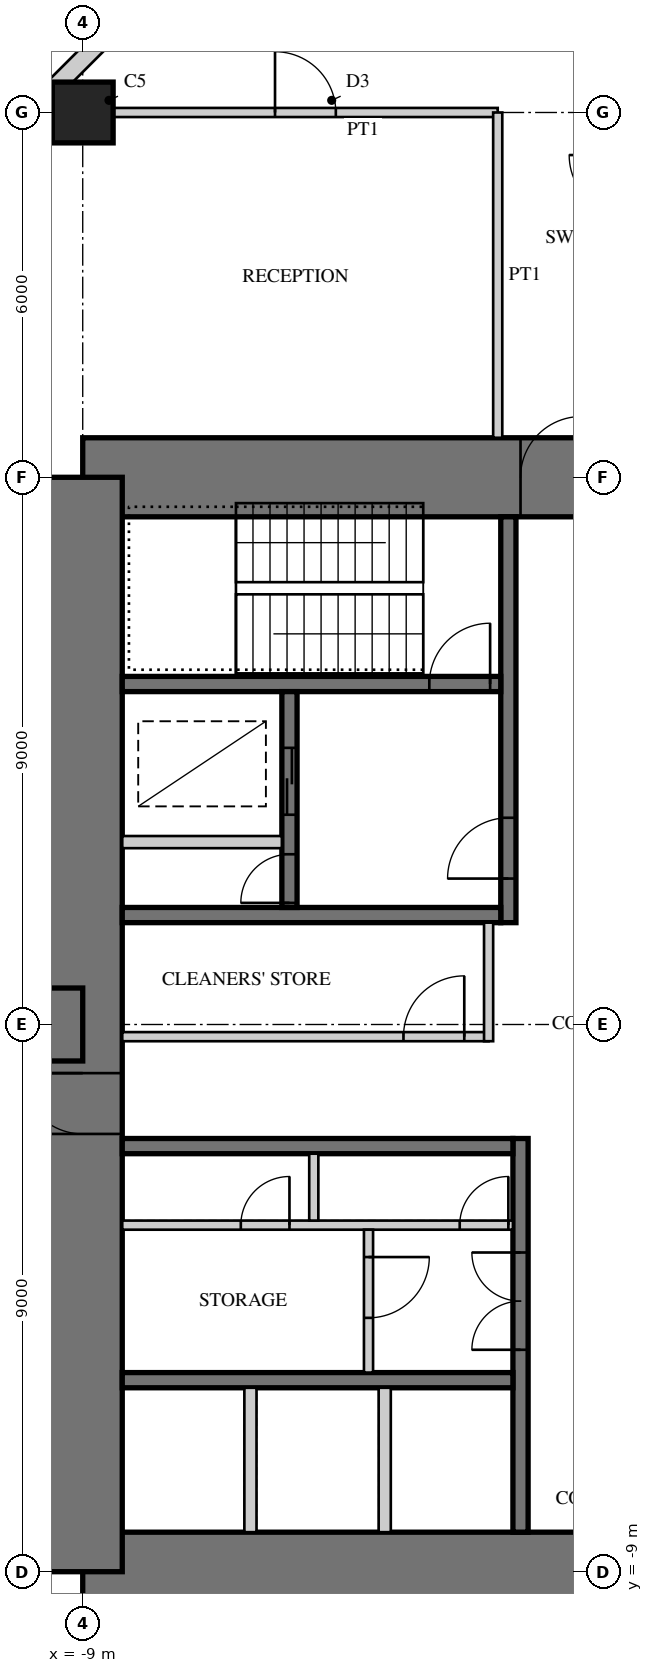
"""IFC4 building model, lengths in metres.
Left out: names, types, materials, properties, quantities, classifications, styles, units other than length and angle.
Written with IfcOpenShell. Run it as: python <this file> out.ifc"""

import sys

from ifc_helpers import new_model, si_unit, direction, frame, frame_2d, origin, origin_2d, place, context, subcontext, project, spatial, rectangle, extrude, element, fill, save


model = new_model("IFC4")
c1 = context("Model", 3, precision=1e-05, world=origin(), true_north=direction((0.0, 1.0)))
c2 = subcontext(c1, "Body", "Model", "MODEL_VIEW")
j1 = project(units=[si_unit("LENGTHUNIT", "METRE"), si_unit("PLANEANGLEUNIT", "RADIAN")], contexts=[c1])
p1 = place(None, origin())
s1 = spatial("IfcSite", under=j1, at=p1, CompositionType="ELEMENT")
p2 = place(p1, origin())
s2 = spatial("IfcBuilding", under=s1, at=p2, CompositionType="ELEMENT")
p3 = place(p2, frame((0.0, 0.0, 152.5)))
s3 = spatial("IfcBuildingStorey", under=s2, at=p3, CompositionType="ELEMENT", Elevation=152.5)
p4 = place(p3, frame((9.0, 9.0, 0.0), z_axis=(0.0, 0.0, 1.0), x_axis=(-1.0, 0.0, 0.0)))
e1 = element("IfcWall", 1, at=p4, inside=s3, PredefinedType="SHEAR", context=c2, shape_type="SweptSolid", body=[
    extrude(rectangle(XDim=18.0, YDim=1.3, at=frame_2d((9.0, 0.0))), origin(), (0.0, 0.0, 1.0), 4.0),
])
p5 = place(p4, frame((9.8, 0.0, 0.0)))
e2 = element("IfcOpeningElement", 2, at=p5, cuts=e1, PredefinedType="OPENING", context=c2, shape_type="SweptSolid", body=[
    extrude(rectangle(XDim=1.0, YDim=2.4, at=frame_2d((0.5, 1.2))), frame((0.0, 0.66, 0.0), z_axis=(0.0, -1.0, 0.0), x_axis=(1.0, 0.0, 0.0)), (0.0, 0.0, 1.0), 1.32),
])
p6 = place(p3, frame((-9.0, -9.0, 0.0), z_axis=(0.0, 0.0, 1.0), x_axis=(1.0, 0.0, 0.0)))
e3 = element("IfcWall", 3, at=p6, inside=s3, PredefinedType="SHEAR", context=c2, shape_type="SweptSolid", body=[
    extrude(rectangle(XDim=18.0, YDim=1.3, at=frame_2d((9.0, 0.0))), origin(), (0.0, 0.0, 1.0), 4.0),
])
p7 = place(p6, frame((9.8, 0.0, 0.0)))
e4 = element("IfcOpeningElement", 4, at=p7, cuts=e3, PredefinedType="OPENING", context=c2, shape_type="SweptSolid", body=[
    extrude(rectangle(XDim=1.0, YDim=2.4, at=frame_2d((0.5, 1.2))), frame((0.0, 0.66, 0.0), z_axis=(0.0, -1.0, 0.0), x_axis=(1.0, 0.0, 0.0)), (0.0, 0.0, 1.0), 1.32),
])
p8 = place(p3, frame((-9.0, 9.0, 0.0), z_axis=(0.0, 0.0, 1.0), x_axis=(0.0, -1.0, 0.0)))
e5 = element("IfcWall", 5, at=p8, inside=s3, PredefinedType="SHEAR", context=c2, shape_type="SweptSolid", body=[
    extrude(rectangle(XDim=18.0, YDim=1.3, at=frame_2d((9.0, 0.0))), origin(), (0.0, 0.0, 1.0), 4.0),
])
p9 = place(p8, frame((9.8, 0.0, 0.0)))
e6 = element("IfcOpeningElement", 6, at=p9, cuts=e5, PredefinedType="OPENING", context=c2, shape_type="SweptSolid", body=[
    extrude(rectangle(XDim=1.0, YDim=2.4, at=frame_2d((0.5, 1.2))), frame((0.0, 0.66, 0.0), z_axis=(0.0, -1.0, 0.0), x_axis=(1.0, 0.0, 0.0)), (0.0, 0.0, 1.0), 1.32),
])
p10 = place(p3, frame((-2.0, 1.675, 0.0), z_axis=(0.0, 0.0, 1.0), x_axis=(0.0, 1.0, 0.0)))
e7 = element("IfcWall", 7, at=p10, inside=s3, PredefinedType="SHEAR", context=c2, shape_type="SweptSolid", body=[
    extrude(rectangle(XDim=6.675, YDim=0.25, at=frame_2d((3.337, 0.0))), origin(), (0.0, 0.0, 1.0), 4.0),
])
p11 = place(p10, frame((0.725, 0.0, 0.0)))
e8 = element("IfcOpeningElement", 8, at=p11, cuts=e7, PredefinedType="OPENING", context=c2, shape_type="SweptSolid", body=[
    extrude(rectangle(XDim=1.0, YDim=2.1, at=frame_2d((0.5, 1.05))), frame((0.0, 0.135, 0.0), z_axis=(0.0, -1.0, 0.0), x_axis=(1.0, 0.0, 0.0)), (0.0, 0.0, 1.0), 0.27),
])
p12 = place(p3, frame((-2.125, 1.8, 0.0), z_axis=(0.0, 0.0, 1.0), x_axis=(-1.0, 0.0, 0.0)))
e9 = element("IfcWall", 9, at=p12, inside=s3, PredefinedType="SHEAR", context=c2, shape_type="SweptSolid", body=[
    extrude(rectangle(XDim=6.225, YDim=0.25, at=frame_2d((3.113, 0.0))), origin(), (0.0, 0.0, 1.0), 4.0),
])
p13 = place(p3, frame((-2.125, 5.6, 0.0), z_axis=(0.0, 0.0, 1.0), x_axis=(-1.0, 0.0, 0.0)))
e10 = element("IfcWall", 10, at=p13, inside=s3, PredefinedType="SHEAR", context=c2, shape_type="SweptSolid", body=[
    extrude(rectangle(XDim=6.225, YDim=0.25, at=frame_2d((3.113, 0.0))), origin(), (0.0, 0.0, 1.0), 4.0),
])
p14 = place(p13, frame((0.175, 0.0, 0.0)))
e11 = element("IfcOpeningElement", 11, at=p14, cuts=e10, PredefinedType="OPENING", context=c2, shape_type="SweptSolid", body=[
    extrude(rectangle(XDim=1.0, YDim=2.1, at=frame_2d((0.5, 1.05))), frame((0.0, 0.135, 0.0), z_axis=(0.0, -1.0, 0.0), x_axis=(1.0, 0.0, 0.0)), (0.0, 0.0, 1.0), 0.27),
])
p15 = place(p3, frame((-5.6, 1.925, 0.0), z_axis=(0.0, 0.0, 1.0), x_axis=(0.0, 1.0, 0.0)))
e12 = element("IfcWall", 12, at=p15, inside=s3, PredefinedType="SHEAR", context=c2, shape_type="SweptSolid", body=[
    extrude(rectangle(XDim=3.55, YDim=0.25, at=frame_2d((1.775, 0.0))), origin(), (0.0, 0.0, 1.0), 4.0),
])
p16 = place(p15, frame((1.525, 0.0, 0.0)))
e13 = element("IfcOpeningElement", 13, at=p16, cuts=e12, PredefinedType="OPENING", context=c2, shape_type="SweptSolid", body=[
    extrude(rectangle(XDim=1.1, YDim=2.2, at=frame_2d((0.55, 1.1))), frame((0.0, 0.135, 0.0), z_axis=(0.0, -1.0, 0.0), x_axis=(1.0, 0.0, 0.0)), (0.0, 0.0, 1.0), 0.27),
])
p17 = place(p15, frame((0.075, 0.0, 0.0)))
e14 = element("IfcOpeningElement", 14, at=p17, cuts=e12, PredefinedType="OPENING", context=c2, shape_type="SweptSolid", body=[
    extrude(rectangle(XDim=0.8, YDim=2.1, at=frame_2d((0.4, 1.05))), frame((0.0, 0.135, 0.0), z_axis=(0.0, -1.0, 0.0), x_axis=(1.0, 0.0, 0.0)), (0.0, 0.0, 1.0), 0.27),
])
p18 = place(p3, frame((-5.725, 3.0, 0.0), z_axis=(0.0, 0.0, 1.0), x_axis=(-1.0, 0.0, 0.0)))
e15 = element("IfcWall", 15, at=p18, inside=s3, PredefinedType="PARTITIONING", context=c2, shape_type="SweptSolid", body=[
    extrude(rectangle(XDim=2.625, YDim=0.2, at=frame_2d((1.312, 0.0))), origin(), (0.0, 0.0, 1.0), 4.0),
])
p19 = place(p3, frame((-1.8, -1.875, 0.0), z_axis=(0.0, 0.0, 1.0), x_axis=(0.0, -1.0, 0.0)))
e16 = element("IfcWall", 16, at=p19, inside=s3, PredefinedType="SHEAR", context=c2, shape_type="SweptSolid", body=[
    extrude(rectangle(XDim=6.475, YDim=0.25, at=frame_2d((3.238, 0.0))), origin(), (0.0, 0.0, 1.0), 4.0),
])
p20 = place(p19, frame((1.875, 0.0, 0.0)))
e17 = element("IfcOpeningElement", 17, at=p20, cuts=e16, PredefinedType="OPENING", context=c2, shape_type="SweptSolid", body=[
    extrude(rectangle(XDim=1.6, YDim=2.4, at=frame_2d((0.8, 1.2))), frame((0.0, 0.135, 0.0), z_axis=(0.0, -1.0, 0.0), x_axis=(1.0, 0.0, 0.0)), (0.0, 0.0, 1.0), 0.27),
])
for number, where, z_axis, x_axis in (
    (18, (-1.925, -2.0, 0.0), (0.0, 0.0, 1.0), (-1.0, 0.0, 0.0)),
    (19, (-1.925, -5.85, 0.0), (0.0, 0.0, 1.0), (-1.0, 0.0, 0.0)),
):
    element("IfcWall", number, at=place(p3, frame(where, z_axis=z_axis, x_axis=x_axis)), inside=s3, PredefinedType="SHEAR", context=c2, shape_type="SweptSolid", body=[
        extrude(rectangle(XDim=6.425, YDim=0.25, at=frame_2d((3.212, 0.0))), origin(), (0.0, 0.0, 1.0), 4.0),
    ])
p21 = place(p3, frame((-1.925, -3.3, 0.0), z_axis=(0.0, 0.0, 1.0), x_axis=(-1.0, 0.0, 0.0)))
e20 = element("IfcWall", 20, at=p21, inside=s3, PredefinedType="PARTITIONING", context=c2, shape_type="SweptSolid", body=[
    extrude(rectangle(XDim=6.425, YDim=0.15, at=frame_2d((3.212, 0.0))), origin(), (0.0, 0.0, 1.0), 4.0),
])
p22 = place(p21, frame((0.075, 0.0, 0.0)))
e21 = element("IfcOpeningElement", 21, at=p22, cuts=e20, PredefinedType="OPENING", context=c2, shape_type="SweptSolid", body=[
    extrude(rectangle(XDim=0.8, YDim=2.1, at=frame_2d((0.4, 1.05))), frame((0.0, 0.085, 0.0), z_axis=(0.0, -1.0, 0.0), x_axis=(1.0, 0.0, 0.0)), (0.0, 0.0, 1.0), 0.17),
])
p23 = place(p21, frame((3.675, 0.0, 0.0)))
e22 = element("IfcOpeningElement", 22, at=p23, cuts=e20, PredefinedType="OPENING", context=c2, shape_type="SweptSolid", body=[
    extrude(rectangle(XDim=0.8, YDim=2.1, at=frame_2d((0.4, 1.05))), frame((0.0, 0.085, 0.0), z_axis=(0.0, -1.0, 0.0), x_axis=(1.0, 0.0, 0.0)), (0.0, 0.0, 1.0), 0.17),
])
p24 = place(p3, frame((-5.2, -2.125, 0.0), z_axis=(0.0, 0.0, 1.0), x_axis=(0.0, -1.0, 0.0)))
e23 = element("IfcWall", 23, at=p24, inside=s3, PredefinedType="PARTITIONING", context=c2, shape_type="SweptSolid", body=[
    extrude(rectangle(XDim=1.1, YDim=0.15, at=frame_2d((0.55, 0.0))), origin(), (0.0, 0.0, 1.0), 4.0),
])
for number, where, z_axis, x_axis in (
    (24, (-4.033, -5.975, 0.0), (0.0, 0.0, 1.0), (0.0, -1.0, 0.0)),
    (25, (-6.242, -5.975, 0.0), (0.0, 0.0, 1.0), (0.0, -1.0, 0.0)),
):
    element("IfcWall", number, at=place(p3, frame(where, z_axis=z_axis, x_axis=x_axis)), inside=s3, PredefinedType="PARTITIONING", context=c2, shape_type="SweptSolid", body=[
        extrude(rectangle(XDim=2.375, YDim=0.2, at=frame_2d((1.188, 0.0))), origin(), (0.0, 0.0, 1.0), 4.0),
    ])
p25 = place(p3, frame((-9.0, 0.0, 0.0), z_axis=(0.0, 0.0, 1.0), x_axis=(-1.0, 0.0, 0.0)))
e26 = element("IfcWall", 26, at=p25, inside=s3, PredefinedType="SHEAR", context=c2, shape_type="SweptSolid", body=[
    extrude(rectangle(XDim=18.0, YDim=1.2, at=frame_2d((9.0, 0.0))), origin(), (0.0, 0.0, 1.0), 4.0),
])
p26 = place(p25, frame((9.8, 0.0, 0.0)))
e27 = element("IfcOpeningElement", 27, at=p26, cuts=e26, PredefinedType="OPENING", context=c2, shape_type="SweptSolid", body=[
    extrude(rectangle(XDim=1.0, YDim=2.2, at=frame_2d((0.5, 1.1))), frame((0.0, 0.61, 0.0), z_axis=(0.0, -1.0, 0.0), x_axis=(1.0, 0.0, 0.0)), (0.0, 0.0, 1.0), 1.22),
])
p27 = place(p3, frame((-9.0, 15.0, 0.0), z_axis=(0.0, 0.0, 1.0), x_axis=(1.0, 0.0, 0.0)))
e28 = element("IfcColumn", 28, at=p27, inside=s3, PredefinedType="COLUMN", context=c2, shape_type="SweptSolid", body=[
    extrude(rectangle(XDim=1.0, YDim=1.0, at=origin_2d()), origin(), (0.0, 0.0, 1.0), 4.0),
])
p28 = place(p3, frame((-6.277, 18.6, 0.0), z_axis=(0.0, 0.0, 1.0), x_axis=(-0.707106781187, -0.707106781187, 0.0)))
e29 = element("IfcWall", 29, at=p28, inside=s3, PredefinedType="SOLIDWALL", context=c2, shape_type="SweptSolid", body=[
    extrude(rectangle(XDim=4.728, YDim=0.3, at=frame_2d((2.364, 0.0))), origin(), (0.0, 0.0, 1.0), 3.8),
])
p29 = place(p28, frame((1.914, 0.0, 0.3)))
e30 = element("IfcOpeningElement", 30, at=p29, cuts=e29, PredefinedType="OPENING", context=c2, shape_type="SweptSolid", body=[
    extrude(rectangle(XDim=0.9, YDim=2.4, at=frame_2d((0.45, 1.2))), frame((0.0, 0.16, 0.0), z_axis=(0.0, -1.0, 0.0), x_axis=(1.0, 0.0, 0.0)), (0.0, 0.0, 1.0), 0.32),
])
p30 = place(p3, frame((-2.325, -0.2, 0.0), z_axis=(0.0, 0.0, 1.0), x_axis=(-1.0, 0.0, 0.0)))
e31 = element("IfcWall", 31, at=p30, inside=s3, PredefinedType="PARTITIONING", context=c2, shape_type="SweptSolid", body=[
    extrude(rectangle(XDim=6.025, YDim=0.15, at=frame_2d((3.013, 0.0))), origin(), (0.0, 0.0, 1.0), 3.8),
])
p31 = place(p30, frame((0.4, 0.0, 0.0)))
e32 = element("IfcOpeningElement", 32, at=p31, cuts=e31, PredefinedType="OPENING", context=c2, shape_type="SweptSolid", body=[
    extrude(rectangle(XDim=1.0, YDim=2.1, at=frame_2d((0.5, 1.05))), frame((0.0, 0.085, 0.0), z_axis=(0.0, -1.0, 0.0), x_axis=(1.0, 0.0, 0.0)), (0.0, 0.0, 1.0), 0.17),
])
p32 = place(p3, frame((-2.325, 1.675, 0.0), z_axis=(0.0, 0.0, 1.0), x_axis=(0.0, -1.0, 0.0)))
e33 = element("IfcWall", 33, at=p32, inside=s3, PredefinedType="PARTITIONING", context=c2, shape_type="SweptSolid", body=[
    extrude(rectangle(XDim=1.95, YDim=0.15, at=frame_2d((0.975, 0.0))), origin(), (0.0, 0.0, 1.0), 3.8),
])
p33 = place(p3, frame((-4.3, -3.375, 0.0), z_axis=(0.0, 0.0, 1.0), x_axis=(0.0, -1.0, 0.0)))
e34 = element("IfcWall", 34, at=p33, inside=s3, PredefinedType="PARTITIONING", context=c2, shape_type="SweptSolid", body=[
    extrude(rectangle(XDim=2.35, YDim=0.15, at=frame_2d((1.175, 0.0))), origin(), (0.0, 0.0, 1.0), 3.8),
])
p34 = place(p33, frame((0.45, 0.0, 0.0)))
e35 = element("IfcOpeningElement", 35, at=p34, cuts=e34, PredefinedType="OPENING", context=c2, shape_type="SweptSolid", body=[
    extrude(rectangle(XDim=1.0, YDim=2.1, at=frame_2d((0.5, 1.05))), frame((0.0, 0.085, 0.0), z_axis=(0.0, -1.0, 0.0), x_axis=(1.0, 0.0, 0.0)), (0.0, 0.0, 1.0), 0.17),
])
p35 = place(p3, frame((-2.175, 15.0, 0.0), z_axis=(0.0, 0.0, 1.0), x_axis=(-1.0, 0.0, 0.0)))
e36 = element("IfcWall", 36, at=p35, inside=s3, PredefinedType="PARTITIONING", context=c2, shape_type="SweptSolid", body=[
    extrude(rectangle(XDim=6.325, YDim=0.15, at=frame_2d((3.163, 0.0))), origin(), (0.0, 0.0, 1.0), 3.0),
])
p36 = place(p35, frame((2.663, 0.0, 0.0)))
e37 = element("IfcOpeningElement", 37, at=p36, cuts=e36, PredefinedType="OPENING", context=c2, shape_type="SweptSolid", body=[
    extrude(rectangle(XDim=1.0, YDim=2.1, at=frame_2d((0.5, 1.05))), frame((0.0, 0.085, 0.0), z_axis=(0.0, -1.0, 0.0), x_axis=(1.0, 0.0, 0.0)), (0.0, 0.0, 1.0), 0.17),
])
p37 = place(p3, frame((-2.175, 9.65, 0.0), z_axis=(0.0, 0.0, 1.0), x_axis=(0.0, 1.0, 0.0)))
e38 = element("IfcWall", 38, at=p37, inside=s3, PredefinedType="PARTITIONING", context=c2, shape_type="SweptSolid", body=[
    extrude(rectangle(XDim=5.35, YDim=0.15, at=frame_2d((2.675, 0.0))), origin(), (0.0, 0.0, 1.0), 3.8),
])
p38 = place(p31, frame((1.0, 0.0, 0.0), z_axis=(0.0, 0.0, 1.0), x_axis=(-1.0, 0.0, 0.0)))
e39 = element("IfcDoor", 39, at=p38, inside=s3, OperationType="SINGLE_SWING_RIGHT", PredefinedType="DOOR", context=c2, shape_type="SweptSolid", body=[
    extrude(rectangle(XDim=1.0, YDim=2.1, at=frame_2d((0.5, 1.05))), frame((0.0, 0.025, 0.0), z_axis=(0.0, -1.0, 0.0), x_axis=(1.0, 0.0, 0.0)), (0.0, 0.0, 1.0), 0.05),
])
fill(e32, e39)
p39 = place(p34, origin())
e40 = element("IfcDoor", 40, at=p39, inside=s3, OperationType="SINGLE_SWING_LEFT", PredefinedType="DOOR", context=c2, shape_type="SweptSolid", body=[
    extrude(rectangle(XDim=1.0, YDim=2.1, at=frame_2d((0.5, 1.05))), frame((0.0, 0.025, 0.0), z_axis=(0.0, -1.0, 0.0), x_axis=(1.0, 0.0, 0.0)), (0.0, 0.0, 1.0), 0.05),
])
fill(e35, e40)
p40 = place(p36, frame((1.0, 0.0, 0.0), z_axis=(0.0, 0.0, 1.0), x_axis=(-1.0, 0.0, 0.0)))
e41 = element("IfcDoor", 41, at=p40, inside=s3, OperationType="SINGLE_SWING_LEFT", PredefinedType="DOOR", context=c2, shape_type="SweptSolid", body=[
    extrude(rectangle(XDim=1.0, YDim=2.1, at=frame_2d((0.5, 1.05))), frame((0.0, 0.025, 0.0), z_axis=(0.0, -1.0, 0.0), x_axis=(1.0, 0.0, 0.0)), (0.0, 0.0, 1.0), 0.05),
])
fill(e37, e41)
p41 = place(p5, frame((1.0, 0.0, 0.0), z_axis=(0.0, 0.0, 1.0), x_axis=(-1.0, 0.0, 0.0)))
e42 = element("IfcDoor", 42, at=p41, inside=s3, OperationType="SINGLE_SWING_RIGHT", PredefinedType="DOOR", context=c2, shape_type="SweptSolid", body=[
    extrude(rectangle(XDim=1.0, YDim=2.4, at=frame_2d((0.5, 1.2))), frame((0.0, -0.005, 0.0), z_axis=(0.0, -1.0, 0.0), x_axis=(1.0, 0.0, 0.0)), (0.0, 0.0, 1.0), 0.05),
])
fill(e2, e42)
p42 = place(p9, frame((1.0, 0.0, 0.0), z_axis=(0.0, 0.0, 1.0), x_axis=(-1.0, 0.0, 0.0)))
e43 = element("IfcDoor", 43, at=p42, inside=s3, OperationType="SINGLE_SWING_RIGHT", PredefinedType="DOOR", context=c2, shape_type="SweptSolid", body=[
    extrude(rectangle(XDim=1.0, YDim=2.4, at=frame_2d((0.5, 1.2))), frame((0.0, -0.005, 0.0), z_axis=(0.0, -1.0, 0.0), x_axis=(1.0, 0.0, 0.0)), (0.0, 0.0, 1.0), 0.05),
])
fill(e6, e43)
p43 = place(p11, origin())
e44 = element("IfcDoor", 44, at=p43, inside=s3, OperationType="SINGLE_SWING_LEFT", PredefinedType="DOOR", context=c2, shape_type="SweptSolid", body=[
    extrude(rectangle(XDim=1.0, YDim=2.1, at=frame_2d((0.5, 1.05))), frame((0.0, 0.025, 0.0), z_axis=(0.0, -1.0, 0.0), x_axis=(1.0, 0.0, 0.0)), (0.0, 0.0, 1.0), 0.05),
])
fill(e8, e44)
p44 = place(p14, frame((1.0, 0.0, 0.0), z_axis=(0.0, 0.0, 1.0), x_axis=(-1.0, 0.0, 0.0)))
e45 = element("IfcDoor", 45, at=p44, inside=s3, OperationType="SINGLE_SWING_RIGHT", PredefinedType="DOOR", context=c2, shape_type="SweptSolid", body=[
    extrude(rectangle(XDim=1.0, YDim=2.1, at=frame_2d((0.5, 1.05))), frame((0.0, 0.025, 0.0), z_axis=(0.0, -1.0, 0.0), x_axis=(1.0, 0.0, 0.0)), (0.0, 0.0, 1.0), 0.05),
])
fill(e11, e45)
p45 = place(p16, origin())
e46 = element("IfcDoor", 46, at=p45, inside=s3, OperationType="DOUBLE_DOOR_SLIDING", PredefinedType="DOOR", context=c2, shape_type="SweptSolid", body=[
    extrude(rectangle(XDim=1.1, YDim=2.2, at=frame_2d((0.55, 1.1))), frame((0.0, 0.025, 0.0), z_axis=(0.0, -1.0, 0.0), x_axis=(1.0, 0.0, 0.0)), (0.0, 0.0, 1.0), 0.05),
])
fill(e13, e46)
p46 = place(p17, origin())
e47 = element("IfcDoor", 47, at=p46, inside=s3, OperationType="SINGLE_SWING_LEFT", PredefinedType="DOOR", context=c2, shape_type="SweptSolid", body=[
    extrude(rectangle(XDim=0.8, YDim=2.1, at=frame_2d((0.4, 1.05))), frame((0.0, 0.025, 0.0), z_axis=(0.0, -1.0, 0.0), x_axis=(1.0, 0.0, 0.0)), (0.0, 0.0, 1.0), 0.05),
])
fill(e14, e47)
p47 = place(p20, frame((1.6, 0.0, 0.0), z_axis=(0.0, 0.0, 1.0), x_axis=(-1.0, 0.0, 0.0)))
e48 = element("IfcDoor", 48, at=p47, inside=s3, OperationType="DOUBLE_DOOR_SINGLE_SWING", PredefinedType="DOOR", context=c2, shape_type="SweptSolid", body=[
    extrude(rectangle(XDim=1.6, YDim=2.4, at=frame_2d((0.8, 1.2))), frame((0.0, 0.025, 0.0), z_axis=(0.0, -1.0, 0.0), x_axis=(1.0, 0.0, 0.0)), (0.0, 0.0, 1.0), 0.05),
])
fill(e17, e48)
p48 = place(p22, frame((0.8, 0.0, 0.0), z_axis=(0.0, 0.0, 1.0), x_axis=(-1.0, 0.0, 0.0)))
e49 = element("IfcDoor", 49, at=p48, inside=s3, OperationType="SINGLE_SWING_RIGHT", PredefinedType="DOOR", context=c2, shape_type="SweptSolid", body=[
    extrude(rectangle(XDim=0.8, YDim=2.1, at=frame_2d((0.4, 1.05))), frame((0.0, 0.025, 0.0), z_axis=(0.0, -1.0, 0.0), x_axis=(1.0, 0.0, 0.0)), (0.0, 0.0, 1.0), 0.05),
])
fill(e21, e49)
p49 = place(p23, frame((0.8, 0.0, 0.0), z_axis=(0.0, 0.0, 1.0), x_axis=(-1.0, 0.0, 0.0)))
e50 = element("IfcDoor", 50, at=p49, inside=s3, OperationType="SINGLE_SWING_RIGHT", PredefinedType="DOOR", context=c2, shape_type="SweptSolid", body=[
    extrude(rectangle(XDim=0.8, YDim=2.1, at=frame_2d((0.4, 1.05))), frame((0.0, 0.025, 0.0), z_axis=(0.0, -1.0, 0.0), x_axis=(1.0, 0.0, 0.0)), (0.0, 0.0, 1.0), 0.05),
])
fill(e22, e50)
save(model, sys.argv[1])
